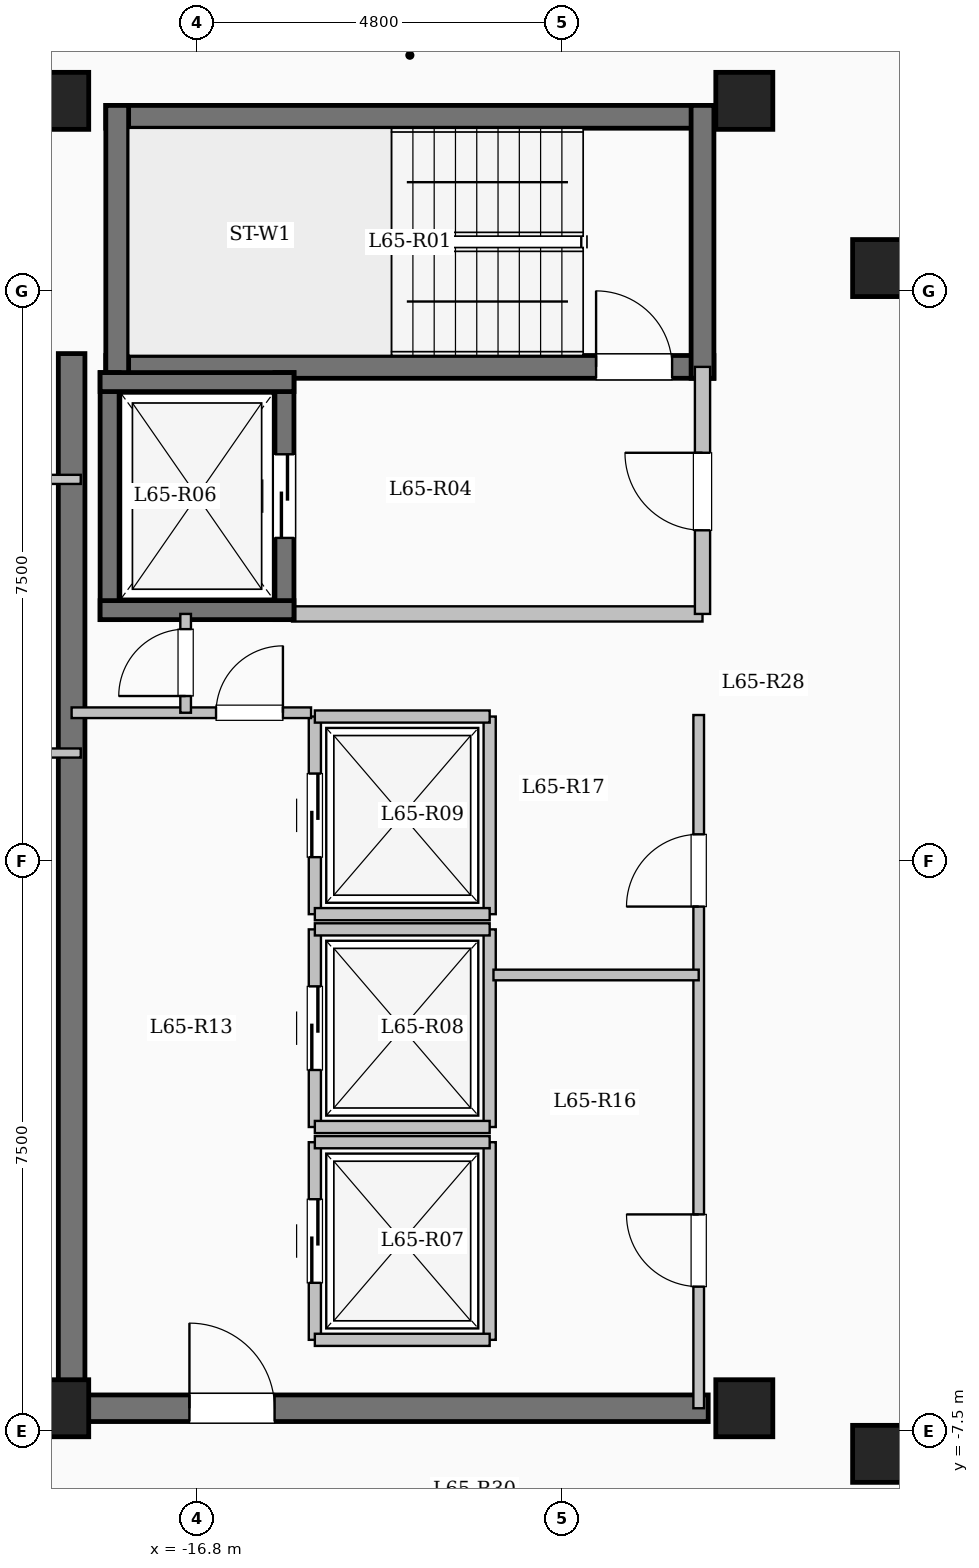
"""IFC4 building model, lengths in metres.
Left out: names, types, materials, properties, quantities, classifications, styles, units other than length and angle.
Written with IfcOpenShell. Run it as: python <this file> out.ifc"""

import sys

from ifc_helpers import new_model, si_unit, direction, frame, frame_2d, origin, origin_2d, place, context, subcontext, project, spatial, rectangle, extrude, element, fill, save


model = new_model("IFC4")
c1 = context("Model", 3, precision=1e-05, world=origin(), true_north=direction((0.0, 1.0)))
c2 = subcontext(c1, "Body", "Model", "MODEL_VIEW")
j1 = project(units=[si_unit("LENGTHUNIT", "METRE"), si_unit("PLANEANGLEUNIT", "RADIAN")], contexts=[c1])
p1 = place(None, origin())
s1 = spatial("IfcSite", under=j1, at=p1, CompositionType="ELEMENT")
p2 = place(p1, origin())
s2 = spatial("IfcBuilding", under=s1, at=p2, CompositionType="ELEMENT")
p3 = place(p2, frame((0.0, 0.0, 241.5)))
s3 = spatial("IfcBuildingStorey", under=s2, at=p3, CompositionType="ELEMENT", Elevation=241.5)
for number, where, z_axis, x_axis in (
    (1, (-7.8, -7.8, 0.0), (0.0, 0.0, 1.0), (1.0, 0.0, 0.0)),
    (2, (-7.8, 7.8, 0.0), (0.0, 0.0, 1.0), (1.0, 0.0, 0.0)),
    (3, (-9.6, -7.2, 0.0), (0.0, 0.0, 1.0), (1.0, 0.0, 0.0)),
    (4, (-9.6, 10.0, 0.0), (0.0, 0.0, 1.0), (1.0, 0.0, 0.0)),
    (5, (-18.6, -7.2, 0.0), (0.0, 0.0, 1.0), (1.0, 0.0, 0.0)),
    (6, (-18.6, 10.0, 0.0), (0.0, 0.0, 1.0), (1.0, 0.0, 0.0)),
):
    element("IfcColumn", number, at=place(p3, frame(where, z_axis=z_axis, x_axis=x_axis)), inside=s3, PredefinedType="COLUMN", context=c2, shape_type="SweptSolid", body=[
        extrude(rectangle(XDim=0.75, YDim=0.75, at=origin_2d()), origin(), (0.0, 0.0, 1.0), 3.35),
    ])
p4 = place(p3, frame((-18.0, 9.79, 0.0), z_axis=(0.0, 0.0, 1.0), x_axis=(1.0, 0.0, 0.0)))
e7 = element("IfcWall", 7, at=p4, inside=s3, PredefinedType="SHEAR", context=c2, shape_type="SweptSolid", body=[
    extrude(rectangle(XDim=8.0, YDim=0.3, at=frame_2d((4.0, 0.0))), origin(), (0.0, 0.0, 1.0), 3.35),
])
p5 = place(p3, frame((-18.0, 6.5, 0.0), z_axis=(0.0, 0.0, 1.0), x_axis=(1.0, 0.0, 0.0)))
e8 = element("IfcWall", 8, at=p5, inside=s3, PredefinedType="SHEAR", context=c2, shape_type="SweptSolid", body=[
    extrude(rectangle(XDim=8.0, YDim=0.3, at=frame_2d((4.0, 0.0))), origin(), (0.0, 0.0, 1.0), 3.35),
])
p6 = place(p5, frame((6.45, 0.0, 0.0)))
e9 = element("IfcOpeningElement", 9, at=p6, cuts=e8, PredefinedType="OPENING", context=c2, shape_type="SweptSolid", body=[
    extrude(rectangle(XDim=1.0, YDim=2.15, at=frame_2d((0.5, 1.075))), frame((0.0, 0.16, 0.0), z_axis=(0.0, -1.0, 0.0), x_axis=(1.0, 0.0, 0.0)), (0.0, 0.0, 1.0), 0.32),
])
for number, where, z_axis, x_axis in (
    (10, (-17.85, 6.35, 0.0), (0.0, 0.0, 1.0), (0.0, 1.0, 0.0)),
    (11, (-10.15, 6.35, 0.0), (0.0, 0.0, 1.0), (0.0, 1.0, 0.0)),
):
    element("IfcWall", number, at=place(p3, frame(where, z_axis=z_axis, x_axis=x_axis)), inside=s3, PredefinedType="SHEAR", context=c2, shape_type="SweptSolid", body=[
        extrude(rectangle(XDim=3.59, YDim=0.3, at=frame_2d((1.795, 0.0))), origin(), (0.0, 0.0, 1.0), 3.35),
    ])
p7 = place(p3, frame((-15.55, 3.25, 0.0), z_axis=(0.0, 0.0, 1.0), x_axis=(1.0, 0.0, 0.0)))
e12 = element("IfcWall", 12, at=p7, inside=s3, PredefinedType="SOLIDWALL", context=c2, shape_type="SweptSolid", body=[
    extrude(rectangle(XDim=5.4, YDim=0.2, at=frame_2d((2.7, 0.0))), origin(), (0.0, 0.0, 1.0), 3.1),
])
p8 = place(p3, frame((-10.15, 3.25, 0.0), z_axis=(0.0, 0.0, 1.0), x_axis=(0.0, 1.0, 0.0)))
e13 = element("IfcWall", 13, at=p8, inside=s3, PredefinedType="SOLIDWALL", context=c2, shape_type="SweptSolid", body=[
    extrude(rectangle(XDim=3.25, YDim=0.2, at=frame_2d((1.625, 0.0))), origin(), (0.0, 0.0, 1.0), 3.1),
])
p9 = place(p8, frame((1.1, 0.0, 0.0)))
e14 = element("IfcOpeningElement", 14, at=p9, cuts=e13, PredefinedType="OPENING", context=c2, shape_type="SweptSolid", body=[
    extrude(rectangle(XDim=1.02, YDim=2.15, at=frame_2d((0.51, 1.075))), frame((0.0, 0.11, 0.0), z_axis=(0.0, -1.0, 0.0), x_axis=(1.0, 0.0, 0.0)), (0.0, 0.0, 1.0), 0.22),
])
p10 = place(p3, frame((-17.95, 3.175, 0.0), z_axis=(0.0, 0.0, 1.0), x_axis=(0.0, 1.0, 0.0)))
e15 = element("IfcWall", 15, at=p10, inside=s3, PredefinedType="SHEAR", context=c2, shape_type="SweptSolid", body=[
    extrude(rectangle(XDim=3.25, YDim=0.25, at=frame_2d((1.625, 0.0))), origin(), (0.0, 0.0, 1.0), 3.35),
])
p11 = place(p3, frame((-15.65, 3.175, 0.0), z_axis=(0.0, 0.0, 1.0), x_axis=(0.0, 1.0, 0.0)))
e16 = element("IfcWall", 16, at=p11, inside=s3, PredefinedType="SHEAR", context=c2, shape_type="SweptSolid", body=[
    extrude(rectangle(XDim=3.25, YDim=0.25, at=frame_2d((1.625, 0.0))), origin(), (0.0, 0.0, 1.0), 3.35),
])
p12 = place(p11, frame((1.075, 0.0, 0.0)))
e17 = element("IfcOpeningElement", 17, at=p12, cuts=e16, PredefinedType="OPENING", context=c2, shape_type="SweptSolid", body=[
    extrude(rectangle(XDim=1.1, YDim=2.15, at=frame_2d((0.55, 1.075))), frame((0.0, 0.135, 0.0), z_axis=(0.0, -1.0, 0.0), x_axis=(1.0, 0.0, 0.0)), (0.0, 0.0, 1.0), 0.27),
])
for number, where, z_axis, x_axis in (
    (18, (-18.075, 3.3, 0.0), (0.0, 0.0, 1.0), (1.0, 0.0, 0.0)),
    (19, (-18.075, 6.3, 0.0), (0.0, 0.0, 1.0), (1.0, 0.0, 0.0)),
):
    element("IfcWall", number, at=place(p3, frame(where, z_axis=z_axis, x_axis=x_axis)), inside=s3, PredefinedType="SHEAR", context=c2, shape_type="SweptSolid", body=[
        extrude(rectangle(XDim=2.55, YDim=0.25, at=frame_2d((1.275, 0.0))), origin(), (0.0, 0.0, 1.0), 3.35),
    ])
p13 = place(p3, frame((-15.25, -6.3, 0.0), z_axis=(0.0, 0.0, 1.0), x_axis=(0.0, 1.0, 0.0)))
e20 = element("IfcWall", 20, at=p13, inside=s3, PredefinedType="SOLIDWALL", context=c2, shape_type="SweptSolid", body=[
    extrude(rectangle(XDim=2.6, YDim=0.16, at=frame_2d((1.3, 0.0))), origin(), (0.0, 0.0, 1.0), 3.1),
])
p14 = place(p13, frame((0.75, 0.0, 0.0)))
e21 = element("IfcOpeningElement", 21, at=p14, cuts=e20, PredefinedType="OPENING", context=c2, shape_type="SweptSolid", body=[
    extrude(rectangle(XDim=1.1, YDim=2.15, at=frame_2d((0.55, 1.075))), frame((0.0, 0.09, 0.0), z_axis=(0.0, -1.0, 0.0), x_axis=(1.0, 0.0, 0.0)), (0.0, 0.0, 1.0), 0.18),
])
p15 = place(p3, frame((-12.95, -6.3, 0.0), z_axis=(0.0, 0.0, 1.0), x_axis=(0.0, 1.0, 0.0)))
e22 = element("IfcWall", 22, at=p15, inside=s3, PredefinedType="SOLIDWALL", context=c2, shape_type="SweptSolid", body=[
    extrude(rectangle(XDim=2.6, YDim=0.16, at=frame_2d((1.3, 0.0))), origin(), (0.0, 0.0, 1.0), 3.1),
])
for number, where, z_axis, x_axis in (
    (23, (-15.25, -6.3, 0.0), (0.0, 0.0, 1.0), (1.0, 0.0, 0.0)),
    (24, (-15.25, -3.7, 0.0), (0.0, 0.0, 1.0), (1.0, 0.0, 0.0)),
):
    element("IfcWall", number, at=place(p3, frame(where, z_axis=z_axis, x_axis=x_axis)), inside=s3, PredefinedType="SOLIDWALL", context=c2, shape_type="SweptSolid", body=[
        extrude(rectangle(XDim=2.3, YDim=0.16, at=frame_2d((1.15, 0.0))), origin(), (0.0, 0.0, 1.0), 3.1),
    ])
p16 = place(p3, frame((-15.25, -3.5, 0.0), z_axis=(0.0, 0.0, 1.0), x_axis=(0.0, 1.0, 0.0)))
e25 = element("IfcWall", 25, at=p16, inside=s3, PredefinedType="SOLIDWALL", context=c2, shape_type="SweptSolid", body=[
    extrude(rectangle(XDim=2.6, YDim=0.16, at=frame_2d((1.3, 0.0))), origin(), (0.0, 0.0, 1.0), 3.1),
])
p17 = place(p16, frame((0.75, 0.0, 0.0)))
e26 = element("IfcOpeningElement", 26, at=p17, cuts=e25, PredefinedType="OPENING", context=c2, shape_type="SweptSolid", body=[
    extrude(rectangle(XDim=1.1, YDim=2.15, at=frame_2d((0.55, 1.075))), frame((0.0, 0.09, 0.0), z_axis=(0.0, -1.0, 0.0), x_axis=(1.0, 0.0, 0.0)), (0.0, 0.0, 1.0), 0.18),
])
p18 = place(p3, frame((-12.95, -3.5, 0.0), z_axis=(0.0, 0.0, 1.0), x_axis=(0.0, 1.0, 0.0)))
e27 = element("IfcWall", 27, at=p18, inside=s3, PredefinedType="SOLIDWALL", context=c2, shape_type="SweptSolid", body=[
    extrude(rectangle(XDim=2.6, YDim=0.16, at=frame_2d((1.3, 0.0))), origin(), (0.0, 0.0, 1.0), 3.1),
])
for number, where, z_axis, x_axis in (
    (28, (-15.25, -3.5, 0.0), (0.0, 0.0, 1.0), (1.0, 0.0, 0.0)),
    (29, (-15.25, -0.9, 0.0), (0.0, 0.0, 1.0), (1.0, 0.0, 0.0)),
):
    element("IfcWall", number, at=place(p3, frame(where, z_axis=z_axis, x_axis=x_axis)), inside=s3, PredefinedType="SOLIDWALL", context=c2, shape_type="SweptSolid", body=[
        extrude(rectangle(XDim=2.3, YDim=0.16, at=frame_2d((1.15, 0.0))), origin(), (0.0, 0.0, 1.0), 3.1),
    ])
p19 = place(p3, frame((-15.25, -0.7, 0.0), z_axis=(0.0, 0.0, 1.0), x_axis=(0.0, 1.0, 0.0)))
e30 = element("IfcWall", 30, at=p19, inside=s3, PredefinedType="SOLIDWALL", context=c2, shape_type="SweptSolid", body=[
    extrude(rectangle(XDim=2.6, YDim=0.16, at=frame_2d((1.3, 0.0))), origin(), (0.0, 0.0, 1.0), 3.1),
])
p20 = place(p19, frame((0.75, 0.0, 0.0)))
e31 = element("IfcOpeningElement", 31, at=p20, cuts=e30, PredefinedType="OPENING", context=c2, shape_type="SweptSolid", body=[
    extrude(rectangle(XDim=1.1, YDim=2.15, at=frame_2d((0.55, 1.075))), frame((0.0, 0.09, 0.0), z_axis=(0.0, -1.0, 0.0), x_axis=(1.0, 0.0, 0.0)), (0.0, 0.0, 1.0), 0.18),
])
p21 = place(p3, frame((-12.95, -0.7, 0.0), z_axis=(0.0, 0.0, 1.0), x_axis=(0.0, 1.0, 0.0)))
e32 = element("IfcWall", 32, at=p21, inside=s3, PredefinedType="SOLIDWALL", context=c2, shape_type="SweptSolid", body=[
    extrude(rectangle(XDim=2.6, YDim=0.16, at=frame_2d((1.3, 0.0))), origin(), (0.0, 0.0, 1.0), 3.1),
])
for number, where, z_axis, x_axis in (
    (33, (-15.25, -0.7, 0.0), (0.0, 0.0, 1.0), (1.0, 0.0, 0.0)),
    (34, (-15.25, 1.9, 0.0), (0.0, 0.0, 1.0), (1.0, 0.0, 0.0)),
):
    element("IfcWall", number, at=place(p3, frame(where, z_axis=z_axis, x_axis=x_axis)), inside=s3, PredefinedType="SOLIDWALL", context=c2, shape_type="SweptSolid", body=[
        extrude(rectangle(XDim=2.3, YDim=0.16, at=frame_2d((1.15, 0.0))), origin(), (0.0, 0.0, 1.0), 3.1),
    ])
p22 = place(p3, frame((-18.45, -7.375, 0.0), z_axis=(0.0, 0.0, 1.0), x_axis=(0.0, 1.0, 0.0)))
e35 = element("IfcWall", 35, at=p22, inside=s3, PredefinedType="SHEAR", context=c2, shape_type="SweptSolid", body=[
    extrude(rectangle(XDim=14.05, YDim=0.35, at=frame_2d((7.025, 0.0))), origin(), (0.0, 0.0, 1.0), 3.35),
])
p23 = place(p3, frame((-18.625, -7.2, 0.0), z_axis=(0.0, 0.0, 1.0), x_axis=(1.0, 0.0, 0.0)))
e36 = element("IfcWall", 36, at=p23, inside=s3, PredefinedType="SHEAR", context=c2, shape_type="SweptSolid", body=[
    extrude(rectangle(XDim=8.55, YDim=0.35, at=frame_2d((4.275, 0.0))), origin(), (0.0, 0.0, 1.0), 3.35),
])
p24 = place(p23, frame((1.725, 0.0, 0.0)))
e37 = element("IfcOpeningElement", 37, at=p24, cuts=e36, PredefinedType="OPENING", context=c2, shape_type="SweptSolid", body=[
    extrude(rectangle(XDim=1.12, YDim=2.15, at=frame_2d((0.56, 1.075))), frame((0.0, 0.185, 0.0), z_axis=(0.0, -1.0, 0.0), x_axis=(1.0, 0.0, 0.0)), (0.0, 0.0, 1.0), 0.37),
])
p25 = place(p3, frame((-18.45, 1.95, 0.0), z_axis=(0.0, 0.0, 1.0), x_axis=(1.0, 0.0, 0.0)))
e38 = element("IfcWall", 38, at=p25, inside=s3, PredefinedType="PARTITIONING", context=c2, shape_type="SweptSolid", body=[
    extrude(rectangle(XDim=3.15, YDim=0.14, at=frame_2d((1.575, 0.0))), origin(), (0.0, 0.0, 1.0), 3.1),
])
p26 = place(p25, frame((1.9, 0.0, 0.0)))
e39 = element("IfcOpeningElement", 39, at=p26, cuts=e38, PredefinedType="OPENING", context=c2, shape_type="SweptSolid", body=[
    extrude(rectangle(XDim=0.88, YDim=2.1, at=frame_2d((0.44, 1.05))), frame((0.0, 0.08, 0.0), z_axis=(0.0, -1.0, 0.0), x_axis=(1.0, 0.0, 0.0)), (0.0, 0.0, 1.0), 0.16),
])
p27 = place(p3, frame((-16.95, 1.95, 0.0), z_axis=(0.0, 0.0, 1.0), x_axis=(0.0, 1.0, 0.0)))
e40 = element("IfcWall", 40, at=p27, inside=s3, PredefinedType="PARTITIONING", context=c2, shape_type="SweptSolid", body=[
    extrude(rectangle(XDim=1.3, YDim=0.14, at=frame_2d((0.65, 0.0))), origin(), (0.0, 0.0, 1.0), 3.1),
])
p28 = place(p27, frame((0.22, 0.0, 0.0)))
e41 = element("IfcOpeningElement", 41, at=p28, cuts=e40, PredefinedType="OPENING", context=c2, shape_type="SweptSolid", body=[
    extrude(rectangle(XDim=0.88, YDim=2.1, at=frame_2d((0.44, 1.05))), frame((0.0, 0.08, 0.0), z_axis=(0.0, -1.0, 0.0), x_axis=(1.0, 0.0, 0.0)), (0.0, 0.0, 1.0), 0.16),
])
p29 = place(p3, frame((-10.2, -7.2, 0.0), z_axis=(0.0, 0.0, 1.0), x_axis=(0.0, 1.0, 0.0)))
e42 = element("IfcWall", 42, at=p29, inside=s3, PredefinedType="PARTITIONING", context=c2, shape_type="SweptSolid", body=[
    extrude(rectangle(XDim=9.12, YDim=0.14, at=frame_2d((4.56, 0.0))), origin(), (0.0, 0.0, 1.0), 3.1),
])
p30 = place(p29, frame((1.6, 0.0, 0.0)))
e43 = element("IfcOpeningElement", 43, at=p30, cuts=e42, PredefinedType="OPENING", context=c2, shape_type="SweptSolid", body=[
    extrude(rectangle(XDim=0.95, YDim=2.12, at=frame_2d((0.475, 1.06))), frame((0.0, 0.08, 0.0), z_axis=(0.0, -1.0, 0.0), x_axis=(1.0, 0.0, 0.0)), (0.0, 0.0, 1.0), 0.16),
])
p31 = place(p29, frame((6.6, 0.0, 0.0)))
e44 = element("IfcOpeningElement", 44, at=p31, cuts=e42, PredefinedType="OPENING", context=c2, shape_type="SweptSolid", body=[
    extrude(rectangle(XDim=0.95, YDim=2.12, at=frame_2d((0.475, 1.06))), frame((0.0, 0.08, 0.0), z_axis=(0.0, -1.0, 0.0), x_axis=(1.0, 0.0, 0.0)), (0.0, 0.0, 1.0), 0.16),
])
p32 = place(p3, frame((-12.9, -1.5, 0.0), z_axis=(0.0, 0.0, 1.0), x_axis=(1.0, 0.0, 0.0)))
e45 = element("IfcWall", 45, at=p32, inside=s3, PredefinedType="PARTITIONING", context=c2, shape_type="SweptSolid", body=[
    extrude(rectangle(XDim=2.7, YDim=0.14, at=frame_2d((1.35, 0.0))), origin(), (0.0, 0.0, 1.0), 3.1),
])
p33 = place(p3, frame((-22.68, -7.25, 0.0), z_axis=(0.0, 0.0, 1.0), x_axis=(1.0, 0.0, 0.0)))
e46 = element("IfcWall", 46, at=p33, inside=s3, PredefinedType="PARTITIONING", context=c2, shape_type="SweptSolid", body=[
    extrude(rectangle(XDim=4.23, YDim=0.15, at=frame_2d((2.115, 0.0))), origin(), (0.0, 0.0, 1.0), 3.1),
])
p34 = place(p33, frame((1.73, 0.0, 0.0)))
e47 = element("IfcOpeningElement", 47, at=p34, cuts=e46, PredefinedType="OPENING", context=c2, shape_type="SweptSolid", body=[
    extrude(rectangle(XDim=0.96, YDim=2.15, at=frame_2d((0.48, 1.075))), frame((0.0, 0.085, 0.0), z_axis=(0.0, -1.0, 0.0), x_axis=(1.0, 0.0, 0.0)), (0.0, 0.0, 1.0), 0.17),
])
p35 = place(p3, frame((-22.8, 1.42, 0.0), z_axis=(0.0, 0.0, 1.0), x_axis=(1.0, 0.0, 0.0)))
e48 = element("IfcWall", 48, at=p35, inside=s3, PredefinedType="PARTITIONING", context=c2, shape_type="SweptSolid", body=[
    extrude(rectangle(XDim=4.47, YDim=0.12, at=frame_2d((2.235, 0.0))), origin(), (0.0, 0.0, 1.0), 3.1),
])
p36 = place(p35, frame((0.713, 0.0, 0.0)))
e49 = element("IfcOpeningElement", 49, at=p36, cuts=e48, PredefinedType="OPENING", context=c2, shape_type="SweptSolid", body=[
    extrude(rectangle(XDim=0.88, YDim=2.1, at=frame_2d((0.44, 1.05))), frame((0.0, 0.07, 0.0), z_axis=(0.0, -1.0, 0.0), x_axis=(1.0, 0.0, 0.0)), (0.0, 0.0, 1.0), 0.14),
])
p37 = place(p35, frame((2.778, 0.0, 0.0)))
e50 = element("IfcOpeningElement", 50, at=p37, cuts=e48, PredefinedType="OPENING", context=c2, shape_type="SweptSolid", body=[
    extrude(rectangle(XDim=0.88, YDim=2.1, at=frame_2d((0.44, 1.05))), frame((0.0, 0.07, 0.0), z_axis=(0.0, -1.0, 0.0), x_axis=(1.0, 0.0, 0.0)), (0.0, 0.0, 1.0), 0.14),
])
p38 = place(p3, frame((-22.8, 5.02, 0.0), z_axis=(0.0, 0.0, 1.0), x_axis=(1.0, 0.0, 0.0)))
e51 = element("IfcWall", 51, at=p38, inside=s3, PredefinedType="PARTITIONING", context=c2, shape_type="SweptSolid", body=[
    extrude(rectangle(XDim=4.47, YDim=0.12, at=frame_2d((2.235, 0.0))), origin(), (0.0, 0.0, 1.0), 3.1),
])
p39 = place(p38, frame((2.9, 0.0, 0.0)))
e52 = element("IfcOpeningElement", 52, at=p39, cuts=e51, PredefinedType="OPENING", context=c2, shape_type="SweptSolid", body=[
    extrude(rectangle(XDim=0.88, YDim=2.1, at=frame_2d((0.44, 1.05))), frame((0.0, 0.07, 0.0), z_axis=(0.0, -1.0, 0.0), x_axis=(1.0, 0.0, 0.0)), (0.0, 0.0, 1.0), 0.14),
])
p40 = place(p6, origin())
e53 = element("IfcDoor", 53, at=p40, inside=s3, OperationType="SINGLE_SWING_LEFT", PredefinedType="DOOR", context=c2, shape_type="SweptSolid", body=[
    extrude(rectangle(XDim=1.0, YDim=2.15, at=frame_2d((0.5, 1.075))), frame((0.0, 0.025, 0.0), z_axis=(0.0, -1.0, 0.0), x_axis=(1.0, 0.0, 0.0)), (0.0, 0.0, 1.0), 0.05),
])
fill(e9, e53)
p41 = place(p9, origin())
e54 = element("IfcDoor", 54, at=p41, inside=s3, OperationType="SINGLE_SWING_RIGHT", PredefinedType="DOOR", context=c2, shape_type="SweptSolid", body=[
    extrude(rectangle(XDim=1.02, YDim=2.15, at=frame_2d((0.51, 1.075))), frame((0.0, 0.025, 0.0), z_axis=(0.0, -1.0, 0.0), x_axis=(1.0, 0.0, 0.0)), (0.0, 0.0, 1.0), 0.05),
])
fill(e14, e54)
p42 = place(p12, origin())
e55 = element("IfcDoor", 55, at=p42, inside=s3, OperationType="SLIDING_TO_LEFT", PredefinedType="DOOR", context=c2, shape_type="SweptSolid", body=[
    extrude(rectangle(XDim=1.1, YDim=2.15, at=frame_2d((0.55, 1.075))), frame((0.0, 0.025, 0.0), z_axis=(0.0, -1.0, 0.0), x_axis=(1.0, 0.0, 0.0)), (0.0, 0.0, 1.0), 0.05),
])
fill(e17, e55)
p43 = place(p14, origin())
e56 = element("IfcDoor", 56, at=p43, inside=s3, OperationType="SLIDING_TO_LEFT", PredefinedType="DOOR", context=c2, shape_type="SweptSolid", body=[
    extrude(rectangle(XDim=1.1, YDim=2.15, at=frame_2d((0.55, 1.075))), frame((0.0, 0.025, 0.0), z_axis=(0.0, -1.0, 0.0), x_axis=(1.0, 0.0, 0.0)), (0.0, 0.0, 1.0), 0.05),
])
fill(e21, e56)
p44 = place(p17, origin())
e57 = element("IfcDoor", 57, at=p44, inside=s3, OperationType="SLIDING_TO_LEFT", PredefinedType="DOOR", context=c2, shape_type="SweptSolid", body=[
    extrude(rectangle(XDim=1.1, YDim=2.15, at=frame_2d((0.55, 1.075))), frame((0.0, 0.025, 0.0), z_axis=(0.0, -1.0, 0.0), x_axis=(1.0, 0.0, 0.0)), (0.0, 0.0, 1.0), 0.05),
])
fill(e26, e57)
p45 = place(p20, origin())
e58 = element("IfcDoor", 58, at=p45, inside=s3, OperationType="SLIDING_TO_LEFT", PredefinedType="DOOR", context=c2, shape_type="SweptSolid", body=[
    extrude(rectangle(XDim=1.1, YDim=2.15, at=frame_2d((0.55, 1.075))), frame((0.0, 0.025, 0.0), z_axis=(0.0, -1.0, 0.0), x_axis=(1.0, 0.0, 0.0)), (0.0, 0.0, 1.0), 0.05),
])
fill(e31, e58)
p46 = place(p24, origin())
e59 = element("IfcDoor", 59, at=p46, inside=s3, OperationType="SINGLE_SWING_LEFT", PredefinedType="DOOR", context=c2, shape_type="SweptSolid", body=[
    extrude(rectangle(XDim=1.12, YDim=2.15, at=frame_2d((0.56, 1.075))), frame((0.0, 0.025, 0.0), z_axis=(0.0, -1.0, 0.0), x_axis=(1.0, 0.0, 0.0)), (0.0, 0.0, 1.0), 0.05),
])
fill(e37, e59)
p47 = place(p26, origin())
e60 = element("IfcDoor", 60, at=p47, inside=s3, OperationType="SINGLE_SWING_RIGHT", PredefinedType="DOOR", context=c2, shape_type="SweptSolid", body=[
    extrude(rectangle(XDim=0.88, YDim=2.1, at=frame_2d((0.44, 1.05))), frame((0.0, 0.025, 0.0), z_axis=(0.0, -1.0, 0.0), x_axis=(1.0, 0.0, 0.0)), (0.0, 0.0, 1.0), 0.05),
])
fill(e39, e60)
p48 = place(p28, origin())
e61 = element("IfcDoor", 61, at=p48, inside=s3, OperationType="SINGLE_SWING_LEFT", PredefinedType="DOOR", context=c2, shape_type="SweptSolid", body=[
    extrude(rectangle(XDim=0.88, YDim=2.1, at=frame_2d((0.44, 1.05))), frame((0.0, 0.025, 0.0), z_axis=(0.0, -1.0, 0.0), x_axis=(1.0, 0.0, 0.0)), (0.0, 0.0, 1.0), 0.05),
])
fill(e41, e61)
p49 = place(p30, origin())
e62 = element("IfcDoor", 62, at=p49, inside=s3, OperationType="SINGLE_SWING_RIGHT", PredefinedType="DOOR", context=c2, shape_type="SweptSolid", body=[
    extrude(rectangle(XDim=0.95, YDim=2.12, at=frame_2d((0.475, 1.06))), frame((0.0, 0.025, 0.0), z_axis=(0.0, -1.0, 0.0), x_axis=(1.0, 0.0, 0.0)), (0.0, 0.0, 1.0), 0.05),
])
fill(e43, e62)
p50 = place(p31, origin())
e63 = element("IfcDoor", 63, at=p50, inside=s3, OperationType="SINGLE_SWING_LEFT", PredefinedType="DOOR", context=c2, shape_type="SweptSolid", body=[
    extrude(rectangle(XDim=0.95, YDim=2.12, at=frame_2d((0.475, 1.06))), frame((0.0, 0.025, 0.0), z_axis=(0.0, -1.0, 0.0), x_axis=(1.0, 0.0, 0.0)), (0.0, 0.0, 1.0), 0.05),
])
fill(e44, e63)
save(model, sys.argv[1])
